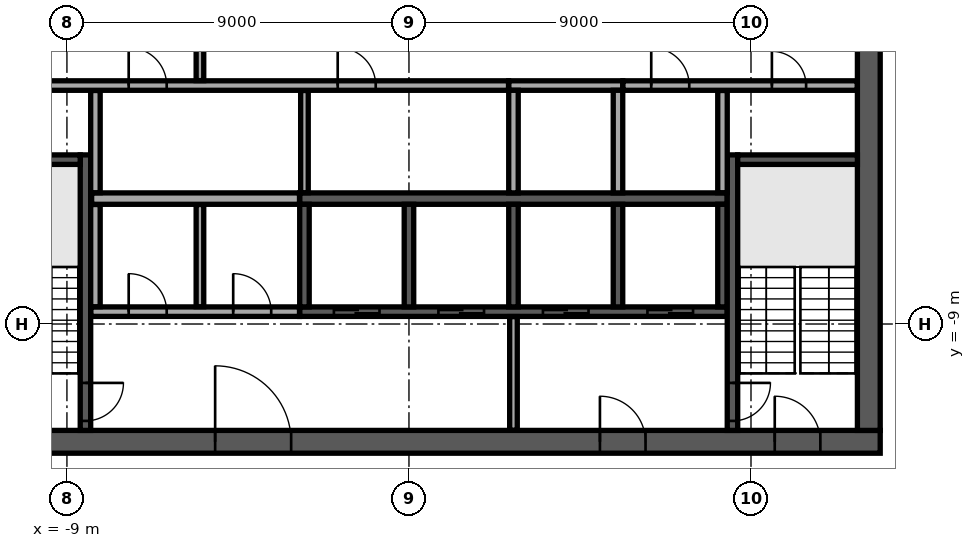
"""IFC4 building model, lengths in metres.
Left out: names, types, materials, properties, quantities, classifications, styles, units other than length and angle.
Written with IfcOpenShell. Run it as: python <this file> out.ifc"""

import sys

from ifc_helpers import new_model, si_unit, direction, frame, frame_2d, origin, place, context, subcontext, project, spatial, rectangle, extrude, element, fill, save


model = new_model("IFC4")
c1 = context("Model", 3, precision=1e-05, world=origin(), true_north=direction((0.0, 1.0)))
c2 = subcontext(c1, "Body", "Model", "MODEL_VIEW")
j1 = project(units=[si_unit("LENGTHUNIT", "METRE"), si_unit("PLANEANGLEUNIT", "RADIAN")], contexts=[c1])
p1 = place(None, origin())
s1 = spatial("IfcSite", under=j1, at=p1, CompositionType="ELEMENT")
p2 = place(p1, origin())
s2 = spatial("IfcBuilding", under=s1, at=p2, CompositionType="ELEMENT")
p3 = place(p2, frame((0.0, 0.0, 300.5)))
s3 = spatial("IfcBuildingStorey", under=s2, at=p3, CompositionType="ELEMENT", Elevation=300.5)
p4 = place(p3, frame((-12.4, -12.1, 0.0), z_axis=(0.0, 0.0, 1.0), x_axis=(1.0, 0.0, 0.0)))
e1 = element("IfcWall", 1, at=p4, inside=s3, PredefinedType="SHEAR", context=c2, shape_type="SweptSolid", body=[
    extrude(rectangle(XDim=24.8, YDim=0.6, at=frame_2d((12.4, 0.0))), origin(), (0.0, 0.0, 1.0), 3.65),
])
p5 = place(p4, frame((7.3, 0.0, 0.0)))
e2 = element("IfcOpeningElement", 2, at=p5, cuts=e1, PredefinedType="OPENING", context=c2, shape_type="SweptSolid", body=[
    extrude(rectangle(XDim=2.0, YDim=2.1, at=frame_2d((1.0, 1.05))), frame((0.0, 0.31, 0.0), z_axis=(0.0, -1.0, 0.0), x_axis=(1.0, 0.0, 0.0)), (0.0, 0.0, 1.0), 0.62),
])
p6 = place(p4, frame((17.425, 0.0, 0.0)))
e3 = element("IfcOpeningElement", 3, at=p6, cuts=e1, PredefinedType="OPENING", context=c2, shape_type="SweptSolid", body=[
    extrude(rectangle(XDim=1.2, YDim=2.1, at=frame_2d((0.6, 1.05))), frame((0.0, 0.31, 0.0), z_axis=(0.0, -1.0, 0.0), x_axis=(1.0, 0.0, 0.0)), (0.0, 0.0, 1.0), 0.62),
])
p7 = place(p4, frame((1.575, 0.0, 0.0)))
e4 = element("IfcOpeningElement", 4, at=p7, cuts=e1, PredefinedType="OPENING", context=c2, shape_type="SweptSolid", body=[
    extrude(rectangle(XDim=1.2, YDim=2.1, at=frame_2d((0.6, 1.05))), frame((0.0, 0.31, 0.0), z_axis=(0.0, -1.0, 0.0), x_axis=(1.0, 0.0, 0.0)), (0.0, 0.0, 1.0), 0.62),
])
p8 = place(p4, frame((22.025, 0.0, 0.0)))
e5 = element("IfcOpeningElement", 5, at=p8, cuts=e1, PredefinedType="OPENING", context=c2, shape_type="SweptSolid", body=[
    extrude(rectangle(XDim=1.2, YDim=2.1, at=frame_2d((0.6, 1.05))), frame((0.0, 0.31, 0.0), z_axis=(0.0, -1.0, 0.0), x_axis=(1.0, 0.0, 0.0)), (0.0, 0.0, 1.0), 0.62),
])
p9 = place(p3, frame((12.1, -11.8, 0.0), z_axis=(0.0, 0.0, 1.0), x_axis=(0.0, 1.0, 0.0)))
e6 = element("IfcWall", 6, at=p9, inside=s3, PredefinedType="SHEAR", context=c2, shape_type="SweptSolid", body=[
    extrude(rectangle(XDim=23.6, YDim=0.6, at=frame_2d((11.8, 0.0))), origin(), (0.0, 0.0, 1.0), 3.65),
])
p10 = place(p9, frame((10.6, 0.0, 0.0)))
e7 = element("IfcOpeningElement", 7, at=p10, cuts=e6, PredefinedType="OPENING", context=c2, shape_type="SweptSolid", body=[
    extrude(rectangle(XDim=2.4, YDim=2.4, at=frame_2d((1.2, 1.2))), frame((0.0, 0.31, 0.0), z_axis=(0.0, -1.0, 0.0), x_axis=(1.0, 0.0, 0.0)), (0.0, 0.0, 1.0), 0.62),
])
p11 = place(p3, frame((-2.875, -5.7, 0.0), z_axis=(0.0, 0.0, 1.0), x_axis=(1.0, 0.0, 0.0)))
e8 = element("IfcWall", 8, at=p11, inside=s3, PredefinedType="SOLIDWALL", context=c2, shape_type="SweptSolid", body=[
    extrude(rectangle(XDim=11.25, YDim=0.3, at=frame_2d((5.625, 0.0))), origin(), (0.0, 0.0, 1.0), 3.65),
])
p12 = place(p3, frame((2.625, -2.725, 0.0), z_axis=(0.0, 0.0, 1.0), x_axis=(1.0, 0.0, 0.0)))
e9 = element("IfcWall", 9, at=p12, inside=s3, PredefinedType="SOLIDWALL", context=c2, shape_type="SweptSolid", body=[
    extrude(rectangle(XDim=3.0, YDim=0.25, at=frame_2d((1.5, 0.0))), origin(), (0.0, 0.0, 1.0), 3.65),
])
for number, where, z_axis, x_axis in (
    (10, (2.75, -5.55, 0.0), (0.0, 0.0, 1.0), (0.0, 1.0, 0.0)),
    (11, (5.5, -5.55, 0.0), (0.0, 0.0, 1.0), (0.0, 1.0, 0.0)),
):
    element("IfcWall", number, at=place(p3, frame(where, z_axis=z_axis, x_axis=x_axis)), inside=s3, PredefinedType="SOLIDWALL", context=c2, shape_type="SweptSolid", body=[
        extrude(rectangle(XDim=2.7, YDim=0.25, at=frame_2d((1.35, 0.0))), origin(), (0.0, 0.0, 1.0), 3.65),
    ])
p13 = place(p3, frame((-2.875, -8.675, 0.0), z_axis=(0.0, 0.0, 1.0), x_axis=(1.0, 0.0, 0.0)))
e12 = element("IfcWall", 12, at=p13, inside=s3, PredefinedType="SOLIDWALL", context=c2, shape_type="SweptSolid", body=[
    extrude(rectangle(XDim=11.25, YDim=0.25, at=frame_2d((5.625, 0.0))), origin(), (0.0, 0.0, 1.0), 3.65),
])
p14 = place(p13, frame((0.9, 0.0, 0.0)))
e13 = element("IfcOpeningElement", 13, at=p14, cuts=e12, PredefinedType="OPENING", context=c2, shape_type="SweptSolid", body=[
    extrude(rectangle(XDim=1.2, YDim=2.1, at=frame_2d((0.6, 1.05))), frame((0.0, 0.135, 0.0), z_axis=(0.0, -1.0, 0.0), x_axis=(1.0, 0.0, 0.0)), (0.0, 0.0, 1.0), 0.27),
])
p15 = place(p13, frame((3.65, 0.0, 0.0)))
e14 = element("IfcOpeningElement", 14, at=p15, cuts=e12, PredefinedType="OPENING", context=c2, shape_type="SweptSolid", body=[
    extrude(rectangle(XDim=1.2, YDim=2.1, at=frame_2d((0.6, 1.05))), frame((0.0, 0.135, 0.0), z_axis=(0.0, -1.0, 0.0), x_axis=(1.0, 0.0, 0.0)), (0.0, 0.0, 1.0), 0.27),
])
p16 = place(p13, frame((6.4, 0.0, 0.0)))
e15 = element("IfcOpeningElement", 15, at=p16, cuts=e12, PredefinedType="OPENING", context=c2, shape_type="SweptSolid", body=[
    extrude(rectangle(XDim=1.2, YDim=2.1, at=frame_2d((0.6, 1.05))), frame((0.0, 0.135, 0.0), z_axis=(0.0, -1.0, 0.0), x_axis=(1.0, 0.0, 0.0)), (0.0, 0.0, 1.0), 0.27),
])
p17 = place(p13, frame((9.15, 0.0, 0.0)))
e16 = element("IfcOpeningElement", 16, at=p17, cuts=e12, PredefinedType="OPENING", context=c2, shape_type="SweptSolid", body=[
    extrude(rectangle(XDim=1.2, YDim=2.1, at=frame_2d((0.6, 1.05))), frame((0.0, 0.135, 0.0), z_axis=(0.0, -1.0, 0.0), x_axis=(1.0, 0.0, 0.0)), (0.0, 0.0, 1.0), 0.27),
])
for number, where, z_axis, x_axis in (
    (17, (-2.75, -8.55, 0.0), (0.0, 0.0, 1.0), (0.0, 1.0, 0.0)),
    (18, (0.0, -8.55, 0.0), (0.0, 0.0, 1.0), (0.0, 1.0, 0.0)),
    (19, (2.75, -8.55, 0.0), (0.0, 0.0, 1.0), (0.0, 1.0, 0.0)),
    (20, (5.5, -8.55, 0.0), (0.0, 0.0, 1.0), (0.0, 1.0, 0.0)),
    (21, (8.25, -8.55, 0.0), (0.0, 0.0, 1.0), (0.0, 1.0, 0.0)),
):
    element("IfcWall", number, at=place(p3, frame(where, z_axis=z_axis, x_axis=x_axis)), inside=s3, PredefinedType="SOLIDWALL", context=c2, shape_type="SweptSolid", body=[
        extrude(rectangle(XDim=2.7, YDim=0.25, at=frame_2d((1.35, 0.0))), origin(), (0.0, 0.0, 1.0), 3.65),
    ])
p18 = place(p3, frame((-8.512, -4.55, 0.0), z_axis=(0.0, 0.0, 1.0), x_axis=(0.0, -1.0, 0.0)))
e22 = element("IfcWall", 22, at=p18, inside=s3, PredefinedType="SOLIDWALL", context=c2, shape_type="SweptSolid", body=[
    extrude(rectangle(XDim=7.25, YDim=0.275, at=frame_2d((3.625, 0.0))), origin(), (0.0, 0.0, 1.0), 3.65),
])
p19 = place(p18, frame((6.0, 0.0, 0.0)))
e23 = element("IfcOpeningElement", 23, at=p19, cuts=e22, PredefinedType="OPENING", context=c2, shape_type="SweptSolid", body=[
    extrude(rectangle(XDim=1.0, YDim=2.1, at=frame_2d((0.5, 1.05))), frame((0.0, 0.147, 0.0), z_axis=(0.0, -1.0, 0.0), x_axis=(1.0, 0.0, 0.0)), (0.0, 0.0, 1.0), 0.295),
])
p20 = place(p3, frame((-8.65, -4.675, 0.0), z_axis=(0.0, 0.0, 1.0), x_axis=(-1.0, 0.0, 0.0)))
e24 = element("IfcWall", 24, at=p20, inside=s3, PredefinedType="SOLIDWALL", context=c2, shape_type="SweptSolid", body=[
    extrude(rectangle(XDim=3.15, YDim=0.25, at=frame_2d((1.575, 0.0))), origin(), (0.0, 0.0, 1.0), 3.65),
])
p21 = place(p3, frame((8.512, -4.55, 0.0), z_axis=(0.0, 0.0, 1.0), x_axis=(0.0, -1.0, 0.0)))
e25 = element("IfcWall", 25, at=p21, inside=s3, PredefinedType="SOLIDWALL", context=c2, shape_type="SweptSolid", body=[
    extrude(rectangle(XDim=7.25, YDim=0.275, at=frame_2d((3.625, 0.0))), origin(), (0.0, 0.0, 1.0), 3.65),
])
p22 = place(p21, frame((6.0, 0.0, 0.0)))
e26 = element("IfcOpeningElement", 26, at=p22, cuts=e25, PredefinedType="OPENING", context=c2, shape_type="SweptSolid", body=[
    extrude(rectangle(XDim=1.0, YDim=2.1, at=frame_2d((0.5, 1.05))), frame((0.0, 0.147, 0.0), z_axis=(0.0, -1.0, 0.0), x_axis=(1.0, 0.0, 0.0)), (0.0, 0.0, 1.0), 0.295),
])
p23 = place(p3, frame((8.65, -4.675, 0.0), z_axis=(0.0, 0.0, 1.0), x_axis=(1.0, 0.0, 0.0)))
e27 = element("IfcWall", 27, at=p23, inside=s3, PredefinedType="SOLIDWALL", context=c2, shape_type="SweptSolid", body=[
    extrude(rectangle(XDim=3.15, YDim=0.25, at=frame_2d((1.575, 0.0))), origin(), (0.0, 0.0, 1.0), 3.65),
])
p24 = place(p3, frame((2.75, -11.795, 0.0), z_axis=(0.0, 0.0, 1.0), x_axis=(0.0, 1.0, 0.0)))
e28 = element("IfcWall", 28, at=p24, inside=s3, PredefinedType="PARTITIONING", context=c2, shape_type="SweptSolid", body=[
    extrude(rectangle(XDim=2.99, YDim=0.2, at=frame_2d((1.495, 0.0))), origin(), (0.0, 0.0, 1.0), 3.65),
])
p25 = place(p3, frame((-8.37, -8.675, 0.0), z_axis=(0.0, 0.0, 1.0), x_axis=(1.0, 0.0, 0.0)))
e29 = element("IfcWall", 29, at=p25, inside=s3, PredefinedType="PARTITIONING", context=c2, shape_type="SweptSolid", body=[
    extrude(rectangle(XDim=5.49, YDim=0.25, at=frame_2d((2.745, 0.0))), origin(), (0.0, 0.0, 1.0), 3.65),
])
p26 = place(p25, frame((0.995, 0.0, 0.0)))
e30 = element("IfcOpeningElement", 30, at=p26, cuts=e29, PredefinedType="OPENING", context=c2, shape_type="SweptSolid", body=[
    extrude(rectangle(XDim=1.0, YDim=2.1, at=frame_2d((0.5, 1.05))), frame((0.0, 0.135, 0.0), z_axis=(0.0, -1.0, 0.0), x_axis=(1.0, 0.0, 0.0)), (0.0, 0.0, 1.0), 0.27),
])
p27 = place(p25, frame((3.745, 0.0, 0.0)))
e31 = element("IfcOpeningElement", 31, at=p27, cuts=e29, PredefinedType="OPENING", context=c2, shape_type="SweptSolid", body=[
    extrude(rectangle(XDim=1.0, YDim=2.1, at=frame_2d((0.5, 1.05))), frame((0.0, 0.135, 0.0), z_axis=(0.0, -1.0, 0.0), x_axis=(1.0, 0.0, 0.0)), (0.0, 0.0, 1.0), 0.27),
])
p28 = place(p3, frame((-8.25, -8.545, 0.0), z_axis=(0.0, 0.0, 1.0), x_axis=(0.0, 1.0, 0.0)))
e32 = element("IfcWall", 32, at=p28, inside=s3, PredefinedType="PARTITIONING", context=c2, shape_type="SweptSolid", body=[
    extrude(rectangle(XDim=2.69, YDim=0.25, at=frame_2d((1.345, 0.0))), origin(), (0.0, 0.0, 1.0), 3.65),
])
p29 = place(p3, frame((-5.5, -8.545, 0.0), z_axis=(0.0, 0.0, 1.0), x_axis=(0.0, 1.0, 0.0)))
e33 = element("IfcWall", 33, at=p29, inside=s3, PredefinedType="PARTITIONING", context=c2, shape_type="SweptSolid", body=[
    extrude(rectangle(XDim=2.69, YDim=0.2, at=frame_2d((1.345, 0.0))), origin(), (0.0, 0.0, 1.0), 3.65),
])
p30 = place(p3, frame((-8.35, -5.7, 0.0), z_axis=(0.0, 0.0, 1.0), x_axis=(1.0, 0.0, 0.0)))
e34 = element("IfcWall", 34, at=p30, inside=s3, PredefinedType="PARTITIONING", context=c2, shape_type="SweptSolid", body=[
    extrude(rectangle(XDim=5.47, YDim=0.3, at=frame_2d((2.735, 0.0))), origin(), (0.0, 0.0, 1.0), 3.65),
])
p31 = place(p3, frame((-8.25, -5.545, 0.0), z_axis=(0.0, 0.0, 1.0), x_axis=(0.0, 1.0, 0.0)))
e35 = element("IfcWall", 35, at=p31, inside=s3, PredefinedType="PARTITIONING", context=c2, shape_type="SweptSolid", body=[
    extrude(rectangle(XDim=2.69, YDim=0.25, at=frame_2d((1.345, 0.0))), origin(), (0.0, 0.0, 1.0), 3.65),
])
p32 = place(p3, frame((-2.75, -5.545, 0.0), z_axis=(0.0, 0.0, 1.0), x_axis=(0.0, 1.0, 0.0)))
e36 = element("IfcWall", 36, at=p32, inside=s3, PredefinedType="PARTITIONING", context=c2, shape_type="SweptSolid", body=[
    extrude(rectangle(XDim=2.69, YDim=0.2, at=frame_2d((1.345, 0.0))), origin(), (0.0, 0.0, 1.0), 3.65),
])
p33 = place(p3, frame((8.25, -5.545, 0.0), z_axis=(0.0, 0.0, 1.0), x_axis=(0.0, 1.0, 0.0)))
e37 = element("IfcWall", 37, at=p33, inside=s3, PredefinedType="PARTITIONING", context=c2, shape_type="SweptSolid", body=[
    extrude(rectangle(XDim=2.69, YDim=0.25, at=frame_2d((1.345, 0.0))), origin(), (0.0, 0.0, 1.0), 3.65),
])
p34 = place(p3, frame((-11.795, -2.725, 0.0), z_axis=(0.0, 0.0, 1.0), x_axis=(1.0, 0.0, 0.0)))
e38 = element("IfcWall", 38, at=p34, inside=s3, PredefinedType="PARTITIONING", context=c2, shape_type="SweptSolid", body=[
    extrude(rectangle(XDim=14.415, YDim=0.25, at=frame_2d((7.208, 0.0))), origin(), (0.0, 0.0, 1.0), 3.65),
])
p35 = place(p34, frame((1.295, 0.0, 0.0)))
e39 = element("IfcOpeningElement", 39, at=p35, cuts=e38, PredefinedType="OPENING", context=c2, shape_type="SweptSolid", body=[
    extrude(rectangle(XDim=1.0, YDim=2.1, at=frame_2d((0.5, 1.05))), frame((0.0, 0.135, 0.0), z_axis=(0.0, -1.0, 0.0), x_axis=(1.0, 0.0, 0.0)), (0.0, 0.0, 1.0), 0.27),
])
p36 = place(p34, frame((4.42, 0.0, 0.0)))
e40 = element("IfcOpeningElement", 40, at=p36, cuts=e38, PredefinedType="OPENING", context=c2, shape_type="SweptSolid", body=[
    extrude(rectangle(XDim=1.0, YDim=2.1, at=frame_2d((0.5, 1.05))), frame((0.0, 0.135, 0.0), z_axis=(0.0, -1.0, 0.0), x_axis=(1.0, 0.0, 0.0)), (0.0, 0.0, 1.0), 0.27),
])
p37 = place(p34, frame((9.92, 0.0, 0.0)))
e41 = element("IfcOpeningElement", 41, at=p37, cuts=e38, PredefinedType="OPENING", context=c2, shape_type="SweptSolid", body=[
    extrude(rectangle(XDim=1.0, YDim=2.1, at=frame_2d((0.5, 1.05))), frame((0.0, 0.135, 0.0), z_axis=(0.0, -1.0, 0.0), x_axis=(1.0, 0.0, 0.0)), (0.0, 0.0, 1.0), 0.27),
])
p38 = place(p3, frame((5.63, -2.725, 0.0), z_axis=(0.0, 0.0, 1.0), x_axis=(1.0, 0.0, 0.0)))
e42 = element("IfcWall", 42, at=p38, inside=s3, PredefinedType="PARTITIONING", context=c2, shape_type="SweptSolid", body=[
    extrude(rectangle(XDim=6.165, YDim=0.25, at=frame_2d((3.083, 0.0))), origin(), (0.0, 0.0, 1.0), 3.65),
])
p39 = place(p38, frame((0.745, 0.0, 0.0)))
e43 = element("IfcOpeningElement", 43, at=p39, cuts=e42, PredefinedType="OPENING", context=c2, shape_type="SweptSolid", body=[
    extrude(rectangle(XDim=1.0, YDim=2.1, at=frame_2d((0.5, 1.05))), frame((0.0, 0.135, 0.0), z_axis=(0.0, -1.0, 0.0), x_axis=(1.0, 0.0, 0.0)), (0.0, 0.0, 1.0), 0.27),
])
p40 = place(p38, frame((3.92, 0.0, 0.0)))
e44 = element("IfcOpeningElement", 44, at=p40, cuts=e42, PredefinedType="OPENING", context=c2, shape_type="SweptSolid", body=[
    extrude(rectangle(XDim=0.9, YDim=2.1, at=frame_2d((0.45, 1.05))), frame((0.0, 0.135, 0.0), z_axis=(0.0, -1.0, 0.0), x_axis=(1.0, 0.0, 0.0)), (0.0, 0.0, 1.0), 0.27),
])
p41 = place(p3, frame((-5.5, -2.595, 0.0), z_axis=(0.0, 0.0, 1.0), x_axis=(0.0, 1.0, 0.0)))
e45 = element("IfcWall", 45, at=p41, inside=s3, PredefinedType="PARTITIONING", context=c2, shape_type="SweptSolid", body=[
    extrude(rectangle(XDim=5.19, YDim=0.2, at=frame_2d((2.595, 0.0))), origin(), (0.0, 0.0, 1.0), 3.65),
])
p42 = place(p41, frame((1.395, 0.0, 0.0)))
e46 = element("IfcOpeningElement", 46, at=p42, cuts=e45, PredefinedType="OPENING", context=c2, shape_type="SweptSolid", body=[
    extrude(rectangle(XDim=2.4, YDim=2.4, at=frame_2d((1.2, 1.2))), frame((0.0, 0.11, 0.0), z_axis=(0.0, -1.0, 0.0), x_axis=(1.0, 0.0, 0.0)), (0.0, 0.0, 1.0), 0.22),
])
p43 = place(p3, frame((-23.896, -11.711, 0.0), z_axis=(0.0, 0.0, 1.0), x_axis=(0.920507643781, -0.390724554821, 0.0)))
e47 = element("IfcWall", 47, at=p43, inside=s3, PredefinedType="PARTITIONING", context=c2, shape_type="SweptSolid", body=[
    extrude(rectangle(XDim=34.917, YDim=0.15, at=frame_2d((17.458, 0.0))), origin(), (0.0, 0.0, 1.0), 3.25),
])
p44 = place(p43, frame((7.05, 0.0, 0.0)))
e48 = element("IfcOpeningElement", 48, at=p44, cuts=e47, PredefinedType="OPENING", context=c2, shape_type="SweptSolid", body=[
    extrude(rectangle(XDim=1.8, YDim=2.1, at=frame_2d((0.9, 1.05))), frame((0.0, 0.085, 0.0), z_axis=(0.0, -1.0, 0.0), x_axis=(1.0, 0.0, 0.0)), (0.0, 0.0, 1.0), 0.17),
])
p45 = place(p43, frame((14.27, 0.0, 0.0)))
e49 = element("IfcOpeningElement", 49, at=p45, cuts=e47, PredefinedType="OPENING", context=c2, shape_type="SweptSolid", body=[
    extrude(rectangle(XDim=1.0, YDim=2.1, at=frame_2d((0.5, 1.05))), frame((0.0, 0.085, 0.0), z_axis=(0.0, -1.0, 0.0), x_axis=(1.0, 0.0, 0.0)), (0.0, 0.0, 1.0), 0.17),
])
p46 = place(p43, frame((29.011, 0.0, 0.0)))
e50 = element("IfcOpeningElement", 50, at=p46, cuts=e47, PredefinedType="OPENING", context=c2, shape_type="SweptSolid", body=[
    extrude(rectangle(XDim=1.0, YDim=2.1, at=frame_2d((0.5, 1.05))), frame((0.0, 0.085, 0.0), z_axis=(0.0, -1.0, 0.0), x_axis=(1.0, 0.0, 0.0)), (0.0, 0.0, 1.0), 0.17),
])
p47 = place(p5, origin())
e51 = element("IfcDoor", 51, at=p47, inside=s3, OperationType="SINGLE_SWING_LEFT", PredefinedType="DOOR", context=c2, shape_type="SweptSolid", body=[
    extrude(rectangle(XDim=2.0, YDim=2.1, at=frame_2d((1.0, 1.05))), frame((0.0, 0.025, 0.0), z_axis=(0.0, -1.0, 0.0), x_axis=(1.0, 0.0, 0.0)), (0.0, 0.0, 1.0), 0.05),
])
fill(e2, e51)
p48 = place(p6, origin())
e52 = element("IfcDoor", 52, at=p48, inside=s3, OperationType="SINGLE_SWING_LEFT", PredefinedType="DOOR", context=c2, shape_type="SweptSolid", body=[
    extrude(rectangle(XDim=1.2, YDim=2.1, at=frame_2d((0.6, 1.05))), frame((0.0, 0.025, 0.0), z_axis=(0.0, -1.0, 0.0), x_axis=(1.0, 0.0, 0.0)), (0.0, 0.0, 1.0), 0.05),
])
fill(e3, e52)
p49 = place(p8, origin())
e53 = element("IfcDoor", 53, at=p49, inside=s3, OperationType="SINGLE_SWING_LEFT", PredefinedType="DOOR", context=c2, shape_type="SweptSolid", body=[
    extrude(rectangle(XDim=1.2, YDim=2.1, at=frame_2d((0.6, 1.05))), frame((0.0, 0.025, 0.0), z_axis=(0.0, -1.0, 0.0), x_axis=(1.0, 0.0, 0.0)), (0.0, 0.0, 1.0), 0.05),
])
fill(e5, e53)
p50 = place(p14, origin())
e54 = element("IfcDoor", 54, at=p50, inside=s3, OperationType="DOUBLE_DOOR_SLIDING", PredefinedType="DOOR", context=c2, shape_type="SweptSolid", body=[
    extrude(rectangle(XDim=1.2, YDim=2.1, at=frame_2d((0.6, 1.05))), frame((0.0, 0.025, 0.0), z_axis=(0.0, -1.0, 0.0), x_axis=(1.0, 0.0, 0.0)), (0.0, 0.0, 1.0), 0.05),
])
fill(e13, e54)
p51 = place(p15, origin())
e55 = element("IfcDoor", 55, at=p51, inside=s3, OperationType="DOUBLE_DOOR_SLIDING", PredefinedType="DOOR", context=c2, shape_type="SweptSolid", body=[
    extrude(rectangle(XDim=1.2, YDim=2.1, at=frame_2d((0.6, 1.05))), frame((0.0, 0.025, 0.0), z_axis=(0.0, -1.0, 0.0), x_axis=(1.0, 0.0, 0.0)), (0.0, 0.0, 1.0), 0.05),
])
fill(e14, e55)
p52 = place(p16, origin())
e56 = element("IfcDoor", 56, at=p52, inside=s3, OperationType="DOUBLE_DOOR_SLIDING", PredefinedType="DOOR", context=c2, shape_type="SweptSolid", body=[
    extrude(rectangle(XDim=1.2, YDim=2.1, at=frame_2d((0.6, 1.05))), frame((0.0, 0.025, 0.0), z_axis=(0.0, -1.0, 0.0), x_axis=(1.0, 0.0, 0.0)), (0.0, 0.0, 1.0), 0.05),
])
fill(e15, e56)
p53 = place(p17, origin())
e57 = element("IfcDoor", 57, at=p53, inside=s3, OperationType="DOUBLE_DOOR_SLIDING", PredefinedType="DOOR", context=c2, shape_type="SweptSolid", body=[
    extrude(rectangle(XDim=1.2, YDim=2.1, at=frame_2d((0.6, 1.05))), frame((0.0, 0.025, 0.0), z_axis=(0.0, -1.0, 0.0), x_axis=(1.0, 0.0, 0.0)), (0.0, 0.0, 1.0), 0.05),
])
fill(e16, e57)
p54 = place(p19, origin())
e58 = element("IfcDoor", 58, at=p54, inside=s3, OperationType="SINGLE_SWING_LEFT", PredefinedType="DOOR", context=c2, shape_type="SweptSolid", body=[
    extrude(rectangle(XDim=1.0, YDim=2.1, at=frame_2d((0.5, 1.05))), frame((0.0, 0.025, 0.0), z_axis=(0.0, -1.0, 0.0), x_axis=(1.0, 0.0, 0.0)), (0.0, 0.0, 1.0), 0.05),
])
fill(e23, e58)
p55 = place(p22, origin())
e59 = element("IfcDoor", 59, at=p55, inside=s3, OperationType="SINGLE_SWING_LEFT", PredefinedType="DOOR", context=c2, shape_type="SweptSolid", body=[
    extrude(rectangle(XDim=1.0, YDim=2.1, at=frame_2d((0.5, 1.05))), frame((0.0, 0.025, 0.0), z_axis=(0.0, -1.0, 0.0), x_axis=(1.0, 0.0, 0.0)), (0.0, 0.0, 1.0), 0.05),
])
fill(e26, e59)
p56 = place(p26, origin())
e60 = element("IfcDoor", 60, at=p56, inside=s3, OperationType="SINGLE_SWING_RIGHT", PredefinedType="DOOR", context=c2, shape_type="SweptSolid", body=[
    extrude(rectangle(XDim=1.0, YDim=2.1, at=frame_2d((0.5, 1.05))), frame((0.0, 0.025, 0.0), z_axis=(0.0, -1.0, 0.0), x_axis=(1.0, 0.0, 0.0)), (0.0, 0.0, 1.0), 0.05),
])
fill(e30, e60)
p57 = place(p27, origin())
e61 = element("IfcDoor", 61, at=p57, inside=s3, OperationType="SINGLE_SWING_RIGHT", PredefinedType="DOOR", context=c2, shape_type="SweptSolid", body=[
    extrude(rectangle(XDim=1.0, YDim=2.1, at=frame_2d((0.5, 1.05))), frame((0.0, 0.025, 0.0), z_axis=(0.0, -1.0, 0.0), x_axis=(1.0, 0.0, 0.0)), (0.0, 0.0, 1.0), 0.05),
])
fill(e31, e61)
p58 = place(p39, origin())
e62 = element("IfcDoor", 62, at=p58, inside=s3, OperationType="SINGLE_SWING_RIGHT", PredefinedType="DOOR", context=c2, shape_type="SweptSolid", body=[
    extrude(rectangle(XDim=1.0, YDim=2.1, at=frame_2d((0.5, 1.05))), frame((0.0, 0.025, 0.0), z_axis=(0.0, -1.0, 0.0), x_axis=(1.0, 0.0, 0.0)), (0.0, 0.0, 1.0), 0.05),
])
fill(e43, e62)
p59 = place(p40, origin())
e63 = element("IfcDoor", 63, at=p59, inside=s3, OperationType="SINGLE_SWING_RIGHT", PredefinedType="DOOR", context=c2, shape_type="SweptSolid", body=[
    extrude(rectangle(XDim=0.9, YDim=2.1, at=frame_2d((0.45, 1.05))), frame((0.0, 0.025, 0.0), z_axis=(0.0, -1.0, 0.0), x_axis=(1.0, 0.0, 0.0)), (0.0, 0.0, 1.0), 0.05),
])
fill(e44, e63)
p60 = place(p36, origin())
e64 = element("IfcDoor", 64, at=p60, inside=s3, OperationType="SINGLE_SWING_RIGHT", PredefinedType="DOOR", context=c2, shape_type="SweptSolid", body=[
    extrude(rectangle(XDim=1.0, YDim=2.1, at=frame_2d((0.5, 1.05))), frame((0.0, 0.025, 0.0), z_axis=(0.0, -1.0, 0.0), x_axis=(1.0, 0.0, 0.0)), (0.0, 0.0, 1.0), 0.05),
])
fill(e40, e64)
p61 = place(p37, origin())
e65 = element("IfcDoor", 65, at=p61, inside=s3, OperationType="SINGLE_SWING_RIGHT", PredefinedType="DOOR", context=c2, shape_type="SweptSolid", body=[
    extrude(rectangle(XDim=1.0, YDim=2.1, at=frame_2d((0.5, 1.05))), frame((0.0, 0.025, 0.0), z_axis=(0.0, -1.0, 0.0), x_axis=(1.0, 0.0, 0.0)), (0.0, 0.0, 1.0), 0.05),
])
fill(e41, e65)
save(model, sys.argv[1])
